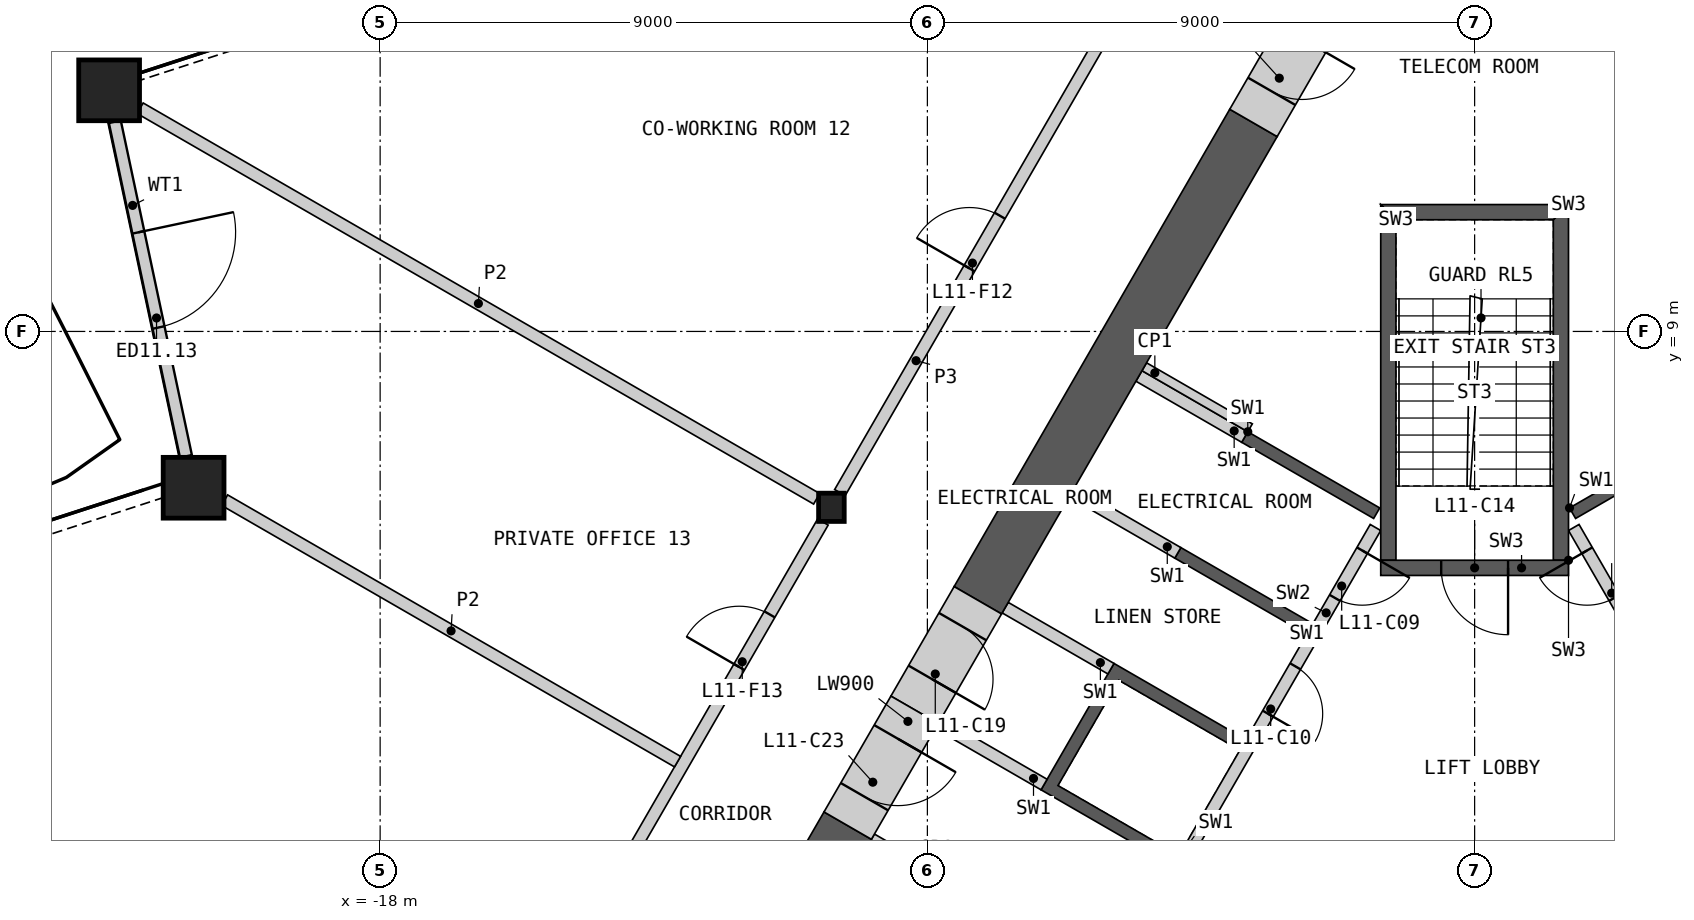
"""IFC4 building model, lengths in metres.
Left out: names, types, materials, properties, quantities, classifications, styles, units other than length and angle.
Written with IfcOpenShell. Run it as: python <this file> out.ifc"""

import sys

from ifc_helpers import new_model, si_unit, direction, frame, frame_2d, origin, origin_2d, place, context, subcontext, project, spatial, polyline, rectangle, hollow_rectangle, i_section, outline, extrude, element, fill, save


model = new_model("IFC4")
c1 = context("Model", 3, precision=1e-05, world=origin(), true_north=direction((0.0, 1.0)))
c2 = subcontext(c1, "Body", "Model", "MODEL_VIEW")
j1 = project(units=[si_unit("LENGTHUNIT", "METRE"), si_unit("PLANEANGLEUNIT", "RADIAN")], contexts=[c1])
p1 = place(None, origin())
s1 = spatial("IfcSite", under=j1, at=p1, CompositionType="ELEMENT")
p2 = place(p1, origin())
s2 = spatial("IfcBuilding", under=s1, at=p2, CompositionType="ELEMENT")
p3 = place(p2, frame((0.0, 0.0, 55.2)))
s3 = spatial("IfcBuildingStorey", under=s2, at=p3, CompositionType="ELEMENT", Elevation=55.2)
for number, where, z_axis, x_axis in (
    (1, (-22.457, 12.966, 0.0), (0.0, 0.0, 1.0), (1.0, 0.0, 0.0)),
    (2, (-21.068, 6.429, 0.0), (0.0, 0.0, 1.0), (1.0, 0.0, 0.0)),
):
    element("IfcColumn", number, at=place(p3, frame(where, z_axis=z_axis, x_axis=x_axis)), inside=s3, PredefinedType="COLUMN", context=c2, shape_type="SweptSolid", body=[
        extrude(hollow_rectangle(XDim=1.0, YDim=1.0, WallThickness=0.07, at=origin_2d()), origin(), (0.0, 0.0, 1.0), 4.2),
    ])
p4 = place(p3, frame((-10.578, 6.107, 0.0), z_axis=(0.0, 0.0, 1.0), x_axis=(1.0, 0.0, 0.0)))
e3 = element("IfcColumn", 3, at=p4, inside=s3, PredefinedType="COLUMN", context=c2, shape_type="SweptSolid", body=[
    extrude(i_section(OverallWidth=0.421, OverallDepth=0.465, WebThickness=0.045, FlangeThickness=0.072, at=origin_2d()), origin(), (0.0, 0.0, 1.0), 4.2),
])
p5 = place(p3, frame((-22.363, 12.449, 0.0), z_axis=(0.0, 0.0, 1.0), x_axis=(0.207901831982, -0.978149696242, 0.0)))
e4 = element("IfcWall", 4, at=p5, inside=s3, PredefinedType="SOLIDWALL", context=c2, shape_type="SweptSolid", body=[
    extrude(rectangle(XDim=5.626, YDim=0.2, at=frame_2d((2.813, 0.0))), origin(), (0.0, 0.0, 1.0), 3.189),
])
p6 = place(p5, frame((1.86, 0.0, 0.0)))
e5 = element("IfcOpeningElement", 5, at=p6, cuts=e4, PredefinedType="OPENING", context=c2, shape_type="SweptSolid", body=[
    extrude(rectangle(XDim=1.6, YDim=2.4, at=frame_2d((0.8, 1.2))), frame((0.0, 0.11, 0.0), z_axis=(0.0, -1.0, 0.0), x_axis=(1.0, 0.0, 0.0)), (0.0, 0.0, 1.0), 0.22),
])
p7 = place(p3, origin())
e6 = element("IfcWall", 6, at=p7, inside=s3, PredefinedType="SHEAR", context=c2, shape_type="SweptSolid", body=[
    extrude(outline(polyline([(1.561, 6.097), (3.731, 7.35), (3.831, 7.177), (1.66, 5.924), (1.561, 6.097)])), origin(), (0.0, 0.0, 1.0), 3.8),
])
p8 = place(p3, frame((5.817, -1.476, 0.0), z_axis=(0.0, 0.0, 1.0), x_axis=(-0.500002616675, 0.866023893041, 0.0)))
e7 = element("IfcWall", 7, at=p8, inside=s3, PredefinedType="SOLIDWALL", context=c2, shape_type="SweptSolid", body=[
    extrude(rectangle(XDim=8.373, YDim=0.2, at=frame_2d((4.187, 0.0))), origin(), (0.0, 0.0, 1.0), 3.8),
])
p9 = place(p8, frame((0.337, 0.0, 0.0)))
e8 = element("IfcOpeningElement", 8, at=p9, cuts=e7, PredefinedType="OPENING", context=c2, shape_type="SweptSolid", body=[
    extrude(rectangle(XDim=1.1, YDim=2.1, at=frame_2d((0.55, 1.05))), frame((0.0, 0.11, 0.0), z_axis=(0.0, -1.0, 0.0), x_axis=(1.0, 0.0, 0.0)), (0.0, 0.0, 1.0), 0.22),
])
p10 = place(p8, frame((2.537, 0.0, 0.0)))
e9 = element("IfcOpeningElement", 9, at=p10, cuts=e7, PredefinedType="OPENING", context=c2, shape_type="SweptSolid", body=[
    extrude(rectangle(XDim=1.1, YDim=2.1, at=frame_2d((0.55, 1.05))), frame((0.0, 0.11, 0.0), z_axis=(0.0, -1.0, 0.0), x_axis=(1.0, 0.0, 0.0)), (0.0, 0.0, 1.0), 0.22),
])
p11 = place(p8, frame((4.737, 0.0, 0.0)))
e10 = element("IfcOpeningElement", 10, at=p11, cuts=e7, PredefinedType="OPENING", context=c2, shape_type="SweptSolid", body=[
    extrude(rectangle(XDim=1.1, YDim=2.1, at=frame_2d((0.55, 1.05))), frame((0.0, 0.11, 0.0), z_axis=(0.0, -1.0, 0.0), x_axis=(1.0, 0.0, 0.0)), (0.0, 0.0, 1.0), 0.22),
])
p12 = place(p8, frame((7.037, 0.0, 0.0)))
e11 = element("IfcOpeningElement", 11, at=p12, cuts=e7, PredefinedType="OPENING", context=c2, shape_type="SweptSolid", body=[
    extrude(rectangle(XDim=0.9, YDim=2.1, at=frame_2d((0.45, 1.05))), frame((0.0, 0.11, 0.0), z_axis=(0.0, -1.0, 0.0), x_axis=(1.0, 0.0, 0.0)), (0.0, 0.0, 1.0), 0.22),
])
p13 = place(p3, origin())
e12 = element("IfcWall", 12, at=p13, inside=s3, PredefinedType="SHEAR", context=c2, shape_type="SweptSolid", body=[
    extrude(outline(polyline([(-4.96, 0.208), (-7.131, 1.461), (-5.931, 3.54), (-3.76, 2.287), (-3.861, 2.113), (-5.852, 3.263), (-6.852, 1.531), (-4.861, 0.381), (-4.96, 0.208)])), origin(), (0.0, 0.0, 1.0), 3.8),
])
p14 = place(p3, origin())
e13 = element("IfcWall", 13, at=p14, inside=s3, PredefinedType="SHEAR", context=c2, shape_type="SweptSolid", body=[
    extrude(outline(polyline([(-2.76, 4.019), (-4.931, 5.272), (-4.831, 5.445), (-2.66, 4.192), (-2.76, 4.019)])), origin(), (0.0, 0.0, 1.0), 3.8),
])
p15 = place(p3, origin())
e14 = element("IfcWall", 14, at=p15, inside=s3, PredefinedType="SHEAR", context=c2, shape_type="SweptSolid", body=[
    extrude(outline(polyline([(-3.731, 7.35), (-1.561, 6.097), (-1.66, 5.924), (-3.831, 7.177), (-3.731, 7.35)])), origin(), (0.0, 0.0, 1.0), 3.8),
])
p16 = place(p3, frame((-1.631, 5.776, 0.0), z_axis=(0.0, 0.0, 1.0), x_axis=(-0.499992876559, -0.866029516466, 0.0)))
e15 = element("IfcWall", 15, at=p16, inside=s3, PredefinedType="SOLIDWALL", context=c2, shape_type="SweptSolid", body=[
    extrude(rectangle(XDim=6.486, YDim=0.2, at=frame_2d((3.243, 0.0))), origin(), (0.0, 0.0, 1.0), 3.8),
])
p17 = place(p16, frame((0.437, 0.0, 0.0)))
e16 = element("IfcOpeningElement", 16, at=p17, cuts=e15, PredefinedType="OPENING", context=c2, shape_type="SweptSolid", body=[
    extrude(rectangle(XDim=0.9, YDim=2.1, at=frame_2d((0.45, 1.05))), frame((0.0, 0.11, 0.0), z_axis=(0.0, -1.0, 0.0), x_axis=(1.0, 0.0, 0.0)), (0.0, 0.0, 1.0), 0.22),
])
p18 = place(p16, frame((2.637, 0.0, 0.0)))
e17 = element("IfcOpeningElement", 17, at=p18, cuts=e15, PredefinedType="OPENING", context=c2, shape_type="SweptSolid", body=[
    extrude(rectangle(XDim=0.9, YDim=2.1, at=frame_2d((0.45, 1.05))), frame((0.0, 0.11, 0.0), z_axis=(0.0, -1.0, 0.0), x_axis=(1.0, 0.0, 0.0)), (0.0, 0.0, 1.0), 0.22),
])
p19 = place(p3, frame((-3.781, 7.263, 0.0), z_axis=(0.0, 0.0, 1.0), x_axis=(-0.865983199114, 0.50007309351, 0.0)))
e18 = element("IfcWall", 18, at=p19, inside=s3, PredefinedType="SHEAR", context=c2, shape_type="SweptSolid", body=[
    extrude(rectangle(XDim=2.009, YDim=0.2, at=frame_2d((1.004, 0.0))), origin(), (0.0, 0.0, 1.0), 3.8),
])
p20 = place(p3, frame((-4.881, 5.358, 0.0), z_axis=(0.0, 0.0, 1.0), x_axis=(-0.866035824272, 0.499981950752, 0.0)))
e19 = element("IfcWall", 19, at=p20, inside=s3, PredefinedType="SHEAR", context=c2, shape_type="SweptSolid", body=[
    extrude(rectangle(XDim=2.009, YDim=0.2, at=frame_2d((1.004, 0.0))), origin(), (0.0, 0.0, 1.0), 3.8),
])
p21 = place(p3, frame((-5.981, 3.453, 0.0), z_axis=(0.0, 0.0, 1.0), x_axis=(-0.866013584312, 0.500020471368, 0.0)))
e20 = element("IfcWall", 20, at=p21, inside=s3, PredefinedType="SHEAR", context=c2, shape_type="SweptSolid", body=[
    extrude(rectangle(XDim=2.009, YDim=0.2, at=frame_2d((1.005, 0.0))), origin(), (0.0, 0.0, 1.0), 3.8),
])
p22 = place(p3, frame((-7.081, 1.548, 0.0), z_axis=(0.0, 0.0, 1.0), x_axis=(-0.865983199114, 0.50007309351, 0.0)))
e21 = element("IfcWall", 21, at=p22, inside=s3, PredefinedType="SHEAR", context=c2, shape_type="SweptSolid", body=[
    extrude(rectangle(XDim=2.009, YDim=0.2, at=frame_2d((1.004, 0.0))), origin(), (0.0, 0.0, 1.0), 3.8),
])
p23 = place(p3, frame((-8.181, -0.357, 0.0), z_axis=(0.0, 0.0, 1.0), x_axis=(-0.866035824272, 0.499981950752, 0.0)))
e22 = element("IfcWall", 22, at=p23, inside=s3, PredefinedType="SHEAR", context=c2, shape_type="SweptSolid", body=[
    extrude(rectangle(XDim=2.009, YDim=0.2, at=frame_2d((1.004, 0.0))), origin(), (0.0, 0.0, 1.0), 3.8),
])
p24 = place(p3, origin())
e23 = element("IfcWall", 23, at=p24, inside=s3, PredefinedType="SHEAR", context=c2, shape_type="SweptSolid", body=[
    extrude(outline(polyline([(1.544, 5.237), (1.544, 11.087), (1.294, 10.837), (1.294, 5.237), (1.544, 5.237)])), origin(), (0.0, 0.0, 1.0), 3.8),
])
p25 = place(p3, origin())
e24 = element("IfcWall", 24, at=p25, inside=s3, PredefinedType="SHEAR", context=c2, shape_type="SweptSolid", body=[
    extrude(outline(polyline([(1.544, 11.087), (-1.544, 11.087), (-1.294, 10.837), (1.294, 10.837), (1.544, 11.087)])), origin(), (0.0, 0.0, 1.0), 3.8),
])
p26 = place(p3, origin())
e25 = element("IfcWall", 25, at=p26, inside=s3, PredefinedType="SHEAR", context=c2, shape_type="SweptSolid", body=[
    extrude(outline(polyline([(-1.294, 10.837), (-1.544, 11.087), (-1.544, 5.237), (-1.294, 5.237), (-1.294, 10.837)])), origin(), (0.0, 0.0, 1.0), 3.8),
])
p27 = place(p3, frame((1.544, 5.112, 0.0), z_axis=(0.0, 0.0, 1.0), x_axis=(-1.0, 0.0, 0.0)))
e26 = element("IfcWall", 26, at=p27, inside=s3, PredefinedType="SHEAR", context=c2, shape_type="SweptSolid", body=[
    extrude(rectangle(XDim=3.088, YDim=0.25, at=frame_2d((1.544, 0.0))), origin(), (0.0, 0.0, 1.0), 3.8),
])
p28 = place(p27, frame((0.994, 0.0, 0.0)))
e27 = element("IfcOpeningElement", 27, at=p28, cuts=e26, PredefinedType="OPENING", context=c2, shape_type="SweptSolid", body=[
    extrude(rectangle(XDim=1.1, YDim=2.1, at=frame_2d((0.55, 1.05))), frame((0.0, 0.135, 0.0), z_axis=(0.0, -1.0, 0.0), x_axis=(1.0, 0.0, 0.0)), (0.0, 0.0, 1.0), 0.27),
])
p29 = place(p3, frame((-3.693, 7.415, 0.0), z_axis=(0.0, 0.0, 1.0), x_axis=(-0.866035824272, 0.499981950752, 0.0)))
e28 = element("IfcWall", 28, at=p29, inside=s3, PredefinedType="PARTITIONING", context=c2, shape_type="SweptSolid", body=[
    extrude(rectangle(XDim=2.009, YDim=0.15, at=frame_2d((1.004, 0.0))), origin(), (0.0, 0.0, 1.0), 3.8),
])
p30 = place(p3, frame((8.16, 4.596, 0.0), z_axis=(0.0, 0.0, 1.0), x_axis=(-0.500009830349, 0.866019728156, 0.0)))
e29 = element("IfcWall", 29, at=p30, inside=s3, PredefinedType="SHEAR", context=c2, shape_type="SweptSolid", body=[
    extrude(rectangle(XDim=15.541, YDim=0.9, at=frame_2d((7.771, 0.0))), origin(), (0.0, 0.0, 1.0), 3.8),
])
p31 = place(p3, frame((-3.637, 12.43, 0.0), z_axis=(0.0, 0.0, 1.0), x_axis=(-0.500011513458, -0.866018756384, 0.0)))
e30 = element("IfcWall", 30, at=p31, inside=s3, PredefinedType="SHEAR", context=c2, shape_type="SweptSolid", body=[
    extrude(rectangle(XDim=9.066, YDim=0.9, at=frame_2d((4.533, 0.0))), origin(), (0.0, 0.0, 1.0), 3.8),
])
p32 = place(p3, frame((-10.31, 0.872, 0.0), z_axis=(0.0, 0.0, 1.0), x_axis=(-0.499968858743, -0.866043382451, 0.0)))
e31 = element("IfcWall", 31, at=p32, inside=s3, PredefinedType="SHEAR", context=c2, shape_type="SweptSolid", body=[
    extrude(rectangle(XDim=4.546, YDim=0.9, at=frame_2d((2.273, 0.0))), origin(), (0.0, 0.0, 1.0), 3.8),
])
p33 = place(p3, frame((-8.17, 4.579, 0.0), z_axis=(0.0, 0.0, 1.0), x_axis=(-0.499888406853, -0.866089822532, 0.0)))
e32 = element("IfcWall", 32, at=p33, inside=s3, PredefinedType="SHEAR", context=c2, shape_type="SweptSolid", body=[
    extrude(rectangle(XDim=2.08, YDim=0.9, at=frame_2d((1.04, 0.0))), origin(), (0.0, 0.0, 1.0), 3.8),
])
p34 = place(p33, frame((0.5, 0.0, 0.0)))
e33 = element("IfcOpeningElement", 33, at=p34, cuts=e32, PredefinedType="OPENING", context=c2, shape_type="SweptSolid", body=[
    extrude(rectangle(XDim=1.0, YDim=2.1, at=frame_2d((0.5, 1.05))), frame((0.0, 0.46, 0.0), z_axis=(0.0, -1.0, 0.0), x_axis=(1.0, 0.0, 0.0)), (0.0, 0.0, 1.0), 0.92),
])
p35 = place(p3, frame((-2.538, 14.335, 0.0), z_axis=(0.0, 0.0, 1.0), x_axis=(-0.499994660107, -0.866028486751, 0.0)))
e34 = element("IfcWall", 34, at=p35, inside=s3, PredefinedType="SHEAR", context=c2, shape_type="SweptSolid", body=[
    extrude(rectangle(XDim=2.2, YDim=0.9, at=frame_2d((1.1, 0.0))), origin(), (0.0, 0.0, 1.0), 3.8),
])
p36 = place(p35, frame((0.6, 0.0, 0.0)))
e35 = element("IfcOpeningElement", 35, at=p36, cuts=e34, PredefinedType="OPENING", context=c2, shape_type="SweptSolid", body=[
    extrude(rectangle(XDim=1.0, YDim=2.1, at=frame_2d((0.5, 1.05))), frame((0.0, 0.46, 0.0), z_axis=(0.0, -1.0, 0.0), x_axis=(1.0, 0.0, 0.0)), (0.0, 0.0, 1.0), 0.92),
])
p37 = place(p3, frame((-9.21, 2.777, 0.0), z_axis=(0.0, 0.0, 1.0), x_axis=(-0.500077893725, -0.86598042715, 0.0)))
e36 = element("IfcWall", 36, at=p37, inside=s3, PredefinedType="SHEAR", context=c2, shape_type="SweptSolid", body=[
    extrude(rectangle(XDim=2.2, YDim=0.9, at=frame_2d((1.1, 0.0))), origin(), (0.0, 0.0, 1.0), 3.8),
])
p38 = place(p37, frame((0.55, 0.0, 0.0)))
e37 = element("IfcOpeningElement", 37, at=p38, cuts=e36, PredefinedType="OPENING", context=c2, shape_type="SweptSolid", body=[
    extrude(rectangle(XDim=1.1, YDim=2.1, at=frame_2d((0.55, 1.05))), frame((0.0, 0.46, 0.0), z_axis=(0.0, -1.0, 0.0), x_axis=(1.0, 0.0, 0.0)), (0.0, 0.0, 1.0), 0.92),
])
p39 = place(p3, frame((-10.439, 6.35, 0.0), z_axis=(0.0, 0.0, 1.0), x_axis=(0.50001002959, 0.86601961312, 0.0)))
e38 = element("IfcWall", 38, at=p39, inside=s3, PredefinedType="PARTITIONING", context=c2, shape_type="SweptSolid", body=[
    extrude(rectangle(XDim=10.019, YDim=0.2, at=frame_2d((5.009, 0.0))), origin(), (0.0, 0.0, 1.0), 3.8),
])
p40 = place(p39, frame((4.259, 0.0, 0.0)))
e39 = element("IfcOpeningElement", 39, at=p40, cuts=e38, PredefinedType="OPENING", context=c2, shape_type="SweptSolid", body=[
    extrude(rectangle(XDim=1.0, YDim=2.1, at=frame_2d((0.5, 1.05))), frame((0.0, 0.11, 0.0), z_axis=(0.0, -1.0, 0.0), x_axis=(1.0, 0.0, 0.0)), (0.0, 0.0, 1.0), 0.22),
])
p41 = place(p3, frame((-15.728, -2.811, 0.0), z_axis=(0.0, 0.0, 1.0), x_axis=(0.49999175339, 0.866030164915, 0.0)))
e40 = element("IfcWall", 40, at=p41, inside=s3, PredefinedType="PARTITIONING", context=c2, shape_type="SweptSolid", body=[
    extrude(rectangle(XDim=10.019, YDim=0.2, at=frame_2d((5.009, 0.0))), origin(), (0.0, 0.0, 1.0), 3.8),
])
p42 = place(p41, frame((7.266, 0.0, 0.0)))
e41 = element("IfcOpeningElement", 41, at=p42, cuts=e40, PredefinedType="OPENING", context=c2, shape_type="SweptSolid", body=[
    extrude(rectangle(XDim=1.0, YDim=2.1, at=frame_2d((0.5, 1.05))), frame((0.0, 0.11, 0.0), z_axis=(0.0, -1.0, 0.0), x_axis=(1.0, 0.0, 0.0)), (0.0, 0.0, 1.0), 0.22),
])
p43 = place(p3, frame((-21.947, 12.671, 0.0), z_axis=(0.0, 0.0, 1.0), x_axis=(0.866026729935, -0.499997703033, 0.0)))
e42 = element("IfcWall", 42, at=p43, inside=s3, PredefinedType="PARTITIONING", context=c2, shape_type="SweptSolid", body=[
    extrude(rectangle(XDim=12.848, YDim=0.2, at=frame_2d((6.424, 0.0))), origin(), (0.0, 0.0, 1.0), 2.885),
])
p44 = place(p3, frame((-20.558, 6.225, 0.0), z_axis=(0.0, 0.0, 1.0), x_axis=(0.866031967744, -0.499988630717, 0.0)))
e43 = element("IfcWall", 43, at=p44, inside=s3, PredefinedType="PARTITIONING", context=c2, shape_type="SweptSolid", body=[
    extrude(rectangle(XDim=8.601, YDim=0.2, at=frame_2d((4.301, 0.0))), origin(), (0.0, 0.0, 1.0), 2.885),
])
p45 = place(p6, origin())
e44 = element("IfcDoor", 44, at=p45, inside=s3, OperationType="DOUBLE_DOOR_SINGLE_SWING", PredefinedType="DOOR", context=c2, shape_type="SweptSolid", body=[
    extrude(rectangle(XDim=1.6, YDim=2.4, at=frame_2d((0.8, 1.2))), frame((0.0, 0.025, 0.0), z_axis=(0.0, -1.0, 0.0), x_axis=(1.0, 0.0, 0.0)), (0.0, 0.0, 1.0), 0.05),
])
fill(e5, e44)
p46 = place(p12, origin())
e45 = element("IfcDoor", 45, at=p46, inside=s3, OperationType="SINGLE_SWING_RIGHT", PredefinedType="DOOR", context=c2, shape_type="SweptSolid", body=[
    extrude(rectangle(XDim=0.9, YDim=2.1, at=frame_2d((0.45, 1.05))), frame((0.0, 0.025, 0.0), z_axis=(0.0, -1.0, 0.0), x_axis=(1.0, 0.0, 0.0)), (0.0, 0.0, 1.0), 0.05),
])
fill(e11, e45)
p47 = place(p17, origin())
e46 = element("IfcDoor", 46, at=p47, inside=s3, OperationType="SINGLE_SWING_LEFT", PredefinedType="DOOR", context=c2, shape_type="SweptSolid", body=[
    extrude(rectangle(XDim=0.9, YDim=2.1, at=frame_2d((0.45, 1.05))), frame((0.0, 0.025, 0.0), z_axis=(0.0, -1.0, 0.0), x_axis=(1.0, 0.0, 0.0)), (0.0, 0.0, 1.0), 0.05),
])
fill(e16, e46)
p48 = place(p18, origin())
e47 = element("IfcDoor", 47, at=p48, inside=s3, OperationType="SINGLE_SWING_RIGHT", PredefinedType="DOOR", context=c2, shape_type="SweptSolid", body=[
    extrude(rectangle(XDim=0.9, YDim=2.1, at=frame_2d((0.45, 1.05))), frame((0.0, 0.025, 0.0), z_axis=(0.0, -1.0, 0.0), x_axis=(1.0, 0.0, 0.0)), (0.0, 0.0, 1.0), 0.05),
])
fill(e17, e47)
p49 = place(p28, origin())
e48 = element("IfcDoor", 48, at=p49, inside=s3, OperationType="SINGLE_SWING_LEFT", PredefinedType="DOOR", context=c2, shape_type="SweptSolid", body=[
    extrude(rectangle(XDim=1.1, YDim=2.1, at=frame_2d((0.55, 1.05))), frame((0.0, 0.025, 0.0), z_axis=(0.0, -1.0, 0.0), x_axis=(1.0, 0.0, 0.0)), (0.0, 0.0, 1.0), 0.05),
])
fill(e27, e48)
p50 = place(p34, origin())
e49 = element("IfcDoor", 49, at=p50, inside=s3, OperationType="SINGLE_SWING_RIGHT", PredefinedType="DOOR", context=c2, shape_type="SweptSolid", body=[
    extrude(rectangle(XDim=1.0, YDim=2.1, at=frame_2d((0.5, 1.05))), frame((0.0, 0.205, 0.0), z_axis=(0.0, -1.0, 0.0), x_axis=(1.0, 0.0, 0.0)), (0.0, 0.0, 1.0), 0.05),
])
fill(e33, e49)
p51 = place(p36, origin())
e50 = element("IfcDoor", 50, at=p51, inside=s3, OperationType="SINGLE_SWING_LEFT", PredefinedType="DOOR", context=c2, shape_type="SweptSolid", body=[
    extrude(rectangle(XDim=1.0, YDim=2.1, at=frame_2d((0.5, 1.05))), frame((0.0, 0.205, 0.0), z_axis=(0.0, -1.0, 0.0), x_axis=(1.0, 0.0, 0.0)), (0.0, 0.0, 1.0), 0.05),
])
fill(e35, e50)
p52 = place(p38, origin())
e51 = element("IfcDoor", 51, at=p52, inside=s3, OperationType="SINGLE_SWING_LEFT", PredefinedType="DOOR", context=c2, shape_type="SweptSolid", body=[
    extrude(rectangle(XDim=1.1, YDim=2.1, at=frame_2d((0.55, 1.05))), frame((0.0, 0.205, 0.0), z_axis=(0.0, -1.0, 0.0), x_axis=(1.0, 0.0, 0.0)), (0.0, 0.0, 1.0), 0.05),
])
fill(e37, e51)
p53 = place(p40, origin())
e52 = element("IfcDoor", 52, at=p53, inside=s3, OperationType="SINGLE_SWING_LEFT", PredefinedType="DOOR", context=c2, shape_type="SweptSolid", body=[
    extrude(rectangle(XDim=1.0, YDim=2.1, at=frame_2d((0.5, 1.05))), frame((0.0, 0.025, 0.0), z_axis=(0.0, -1.0, 0.0), x_axis=(1.0, 0.0, 0.0)), (0.0, 0.0, 1.0), 0.05),
])
fill(e39, e52)
p54 = place(p42, origin())
e53 = element("IfcDoor", 53, at=p54, inside=s3, OperationType="SINGLE_SWING_LEFT", PredefinedType="DOOR", context=c2, shape_type="SweptSolid", body=[
    extrude(rectangle(XDim=1.0, YDim=2.1, at=frame_2d((0.5, 1.05))), frame((0.0, 0.025, 0.0), z_axis=(0.0, -1.0, 0.0), x_axis=(1.0, 0.0, 0.0)), (0.0, 0.0, 1.0), 0.05),
])
fill(e41, e53)
save(model, sys.argv[1])
